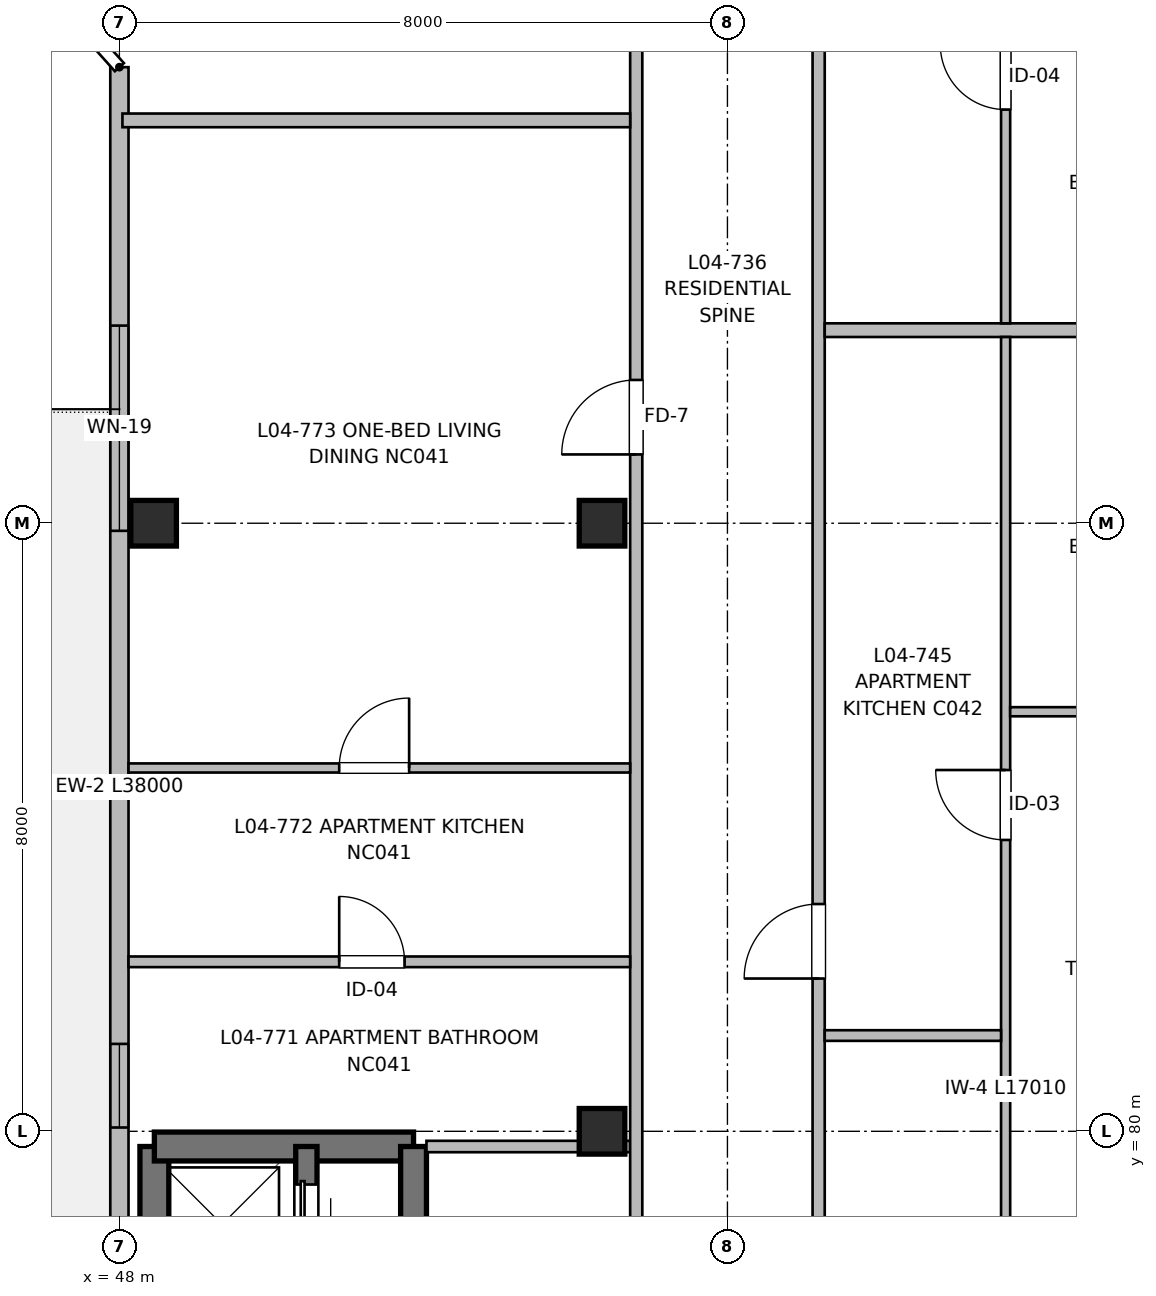
"""IFC4 building model, lengths in metres.
Left out: names, types, materials, properties, quantities, classifications, styles, units other than length and angle.
Written with IfcOpenShell. Run it as: python <this file> out.ifc"""

import sys

from ifc_helpers import new_model, si_unit, direction, frame, frame_2d, origin, origin_2d, place, context, subcontext, project, spatial, rectangle, extrude, element, fill, save


model = new_model("IFC4")
c1 = context("Model", 3, precision=1e-05, world=origin(), true_north=direction((0.0, 1.0)))
c2 = subcontext(c1, "Body", "Model", "MODEL_VIEW")
j1 = project(units=[si_unit("LENGTHUNIT", "METRE"), si_unit("PLANEANGLEUNIT", "RADIAN")], contexts=[c1])
p1 = place(None, origin())
s1 = spatial("IfcSite", under=j1, at=p1, CompositionType="ELEMENT")
p2 = place(p1, origin())
s2 = spatial("IfcBuilding", under=s1, at=p2, CompositionType="ELEMENT")
p3 = place(p2, frame((0.0, 0.0, 13.76)))
s3 = spatial("IfcBuildingStorey", under=s2, at=p3, CompositionType="ELEMENT", Elevation=13.76)
for number, where, z_axis, x_axis in (
    (1, (48.45, 88.0, 0.0), (0.0, 0.0, 1.0), (1.0, 0.0, 0.0)),
    (2, (54.35, 80.0, 0.0), (0.0, 0.0, 1.0), (1.0, 0.0, 0.0)),
    (3, (54.35, 88.0, 0.0), (0.0, 0.0, 1.0), (1.0, 0.0, 0.0)),
):
    element("IfcColumn", number, at=place(p3, frame(where, z_axis=z_axis, x_axis=x_axis)), inside=s3, PredefinedType="COLUMN", context=c2, shape_type="SweptSolid", body=[
        extrude(rectangle(XDim=0.6, YDim=0.6, at=origin_2d()), origin(), (0.0, 0.0, 1.0), 3.2),
    ])
p4 = place(p3, frame((48.46, 67.35, 0.0), z_axis=(0.0, 0.0, 1.0), x_axis=(0.0, 1.0, 0.0)))
e4 = element("IfcWall", 4, at=p4, inside=s3, PredefinedType="SHEAR", context=c2, shape_type="SweptSolid", body=[
    extrude(rectangle(XDim=12.45, YDim=0.38, at=frame_2d((6.225, 0.0))), origin(), (0.0, 0.0, 1.0), 3.2),
])
p5 = place(p4, frame((2.2, 0.0, 0.97)))
e5 = element("IfcOpeningElement", 5, at=p5, cuts=e4, PredefinedType="OPENING", context=c2, shape_type="SweptSolid", body=[
    extrude(rectangle(XDim=0.95, YDim=1.25, at=frame_2d((0.475, 0.625))), frame((0.0, 0.2, 0.0), z_axis=(0.0, -1.0, 0.0), x_axis=(1.0, 0.0, 0.0)), (0.0, 0.0, 1.0), 0.4),
])
p6 = place(p3, frame((48.46, 79.8, 0.0), z_axis=(0.0, 0.0, 1.0), x_axis=(1.0, 0.0, 0.0)))
e6 = element("IfcWall", 6, at=p6, inside=s3, PredefinedType="SHEAR", context=c2, shape_type="SweptSolid", body=[
    extrude(rectangle(XDim=3.41, YDim=0.38, at=frame_2d((1.705, 0.0))), origin(), (0.0, 0.0, 1.0), 3.2),
])
p7 = place(p3, frame((51.87, 79.8, 0.0), z_axis=(0.0, 0.0, 1.0), x_axis=(0.0, -1.0, 0.0)))
e7 = element("IfcWall", 7, at=p7, inside=s3, PredefinedType="SHEAR", context=c2, shape_type="SweptSolid", body=[
    extrude(rectangle(XDim=12.45, YDim=0.34, at=frame_2d((6.225, 0.0))), origin(), (0.0, 0.0, 1.0), 3.2),
])
p8 = place(p7, frame((10.85, 0.0, 0.0)))
e8 = element("IfcOpeningElement", 8, at=p8, cuts=e7, PredefinedType="OPENING", context=c2, shape_type="SweptSolid", body=[
    extrude(rectangle(XDim=1.05, YDim=2.15, at=frame_2d((0.525, 1.075))), frame((0.0, 0.18, 0.0), z_axis=(0.0, -1.0, 0.0), x_axis=(1.0, 0.0, 0.0)), (0.0, 0.0, 1.0), 0.36),
])
p9 = place(p3, frame((50.46, 74.55, 0.0), z_axis=(0.0, 0.0, 1.0), x_axis=(0.0, 1.0, 0.0)))
e9 = element("IfcWall", 9, at=p9, inside=s3, PredefinedType="SHEAR", context=c2, shape_type="SweptSolid", body=[
    extrude(rectangle(XDim=5.25, YDim=0.28, at=frame_2d((2.625, 0.0))), origin(), (0.0, 0.0, 1.0), 3.2),
])
p10 = place(p9, frame((1.15, 0.0, 0.0)))
e10 = element("IfcOpeningElement", 10, at=p10, cuts=e9, PredefinedType="OPENING", context=c2, shape_type="SweptSolid", body=[
    extrude(rectangle(XDim=1.0, YDim=2.15, at=frame_2d((0.5, 1.075))), frame((0.0, 0.15, 0.0), z_axis=(0.0, -1.0, 0.0), x_axis=(1.0, 0.0, 0.0)), (0.0, 0.0, 1.0), 0.3),
])
p11 = place(p9, frame((3.85, 0.0, 0.0)))
e11 = element("IfcOpeningElement", 11, at=p11, cuts=e9, PredefinedType="OPENING", context=c2, shape_type="SweptSolid", body=[
    extrude(rectangle(XDim=0.9, YDim=2.15, at=frame_2d((0.45, 1.075))), frame((0.0, 0.15, 0.0), z_axis=(0.0, -1.0, 0.0), x_axis=(1.0, 0.0, 0.0)), (0.0, 0.0, 1.0), 0.3),
])
p12 = place(p3, frame((48.0, 56.0, 0.0), z_axis=(0.0, 0.0, 1.0), x_axis=(0.0, 1.0, 0.0)))
e12 = element("IfcWall", 12, at=p12, inside=s3, PredefinedType="SOLIDWALL", context=c2, shape_type="SweptSolid", body=[
    extrude(rectangle(XDim=38.0, YDim=0.24, at=frame_2d((19.0, 0.0))), origin(), (0.0, 0.0, 1.0), 2.98),
])
p13 = place(p12, frame((4.15, 0.0, 0.0)))
e13 = element("IfcOpeningElement", 13, at=p13, cuts=e12, PredefinedType="OPENING", context=c2, shape_type="SweptSolid", body=[
    extrude(rectangle(XDim=1.2, YDim=2.2, at=frame_2d((0.6, 1.1))), frame((0.0, 0.13, 0.0), z_axis=(0.0, -1.0, 0.0), x_axis=(1.0, 0.0, 0.0)), (0.0, 0.0, 1.0), 0.26),
])
p14 = place(p12, frame((6.05, 0.0, 0.77)))
e14 = element("IfcOpeningElement", 14, at=p14, cuts=e12, PredefinedType="OPENING", context=c2, shape_type="SweptSolid", body=[
    extrude(rectangle(XDim=1.45, YDim=1.45, at=frame_2d((0.725, 0.725))), frame((0.0, 0.13, 0.0), z_axis=(0.0, -1.0, 0.0), x_axis=(1.0, 0.0, 0.0)), (0.0, 0.0, 1.0), 0.26),
])
p15 = place(p12, frame((13.925, 0.0, 0.9)))
e15 = element("IfcOpeningElement", 15, at=p15, cuts=e12, PredefinedType="OPENING", context=c2, shape_type="SweptSolid", body=[
    extrude(rectangle(XDim=0.65, YDim=0.95, at=frame_2d((0.325, 0.475))), frame((0.0, 0.13, 0.0), z_axis=(0.0, -1.0, 0.0), x_axis=(1.0, 0.0, 0.0)), (0.0, 0.0, 1.0), 0.26),
])
p16 = place(p12, frame((24.05, 0.0, 0.62)))
e16 = element("IfcOpeningElement", 16, at=p16, cuts=e12, PredefinedType="OPENING", context=c2, shape_type="SweptSolid", body=[
    extrude(rectangle(XDim=1.1, YDim=1.6, at=frame_2d((0.55, 0.8))), frame((0.0, 0.13, 0.0), z_axis=(0.0, -1.0, 0.0), x_axis=(1.0, 0.0, 0.0)), (0.0, 0.0, 1.0), 0.26),
])
p17 = place(p12, frame((31.9, 0.0, 0.47)))
e17 = element("IfcOpeningElement", 17, at=p17, cuts=e12, PredefinedType="OPENING", context=c2, shape_type="SweptSolid", body=[
    extrude(rectangle(XDim=2.7, YDim=1.75, at=frame_2d((1.35, 0.875))), frame((0.0, 0.13, 0.0), z_axis=(0.0, -1.0, 0.0), x_axis=(1.0, 0.0, 0.0)), (0.0, 0.0, 1.0), 0.26),
])
p18 = place(p3, frame((52.04, 79.8, 0.0), z_axis=(0.0, 0.0, 1.0), x_axis=(1.0, 0.0, 0.0)))
e18 = element("IfcWall", 18, at=p18, inside=s3, PredefinedType="PARTITIONING", context=c2, shape_type="SweptSolid", body=[
    extrude(rectangle(XDim=2.68, YDim=0.15, at=frame_2d((1.34, 0.0))), origin(), (0.0, 0.0, 1.0), 2.935),
])
p19 = place(p3, frame((54.8, 56.16, 0.0), z_axis=(0.0, 0.0, 1.0), x_axis=(0.0, 1.0, 0.0)))
e19 = element("IfcWall", 19, at=p19, inside=s3, PredefinedType="PARTITIONING", context=c2, shape_type="SweptSolid", body=[
    extrude(rectangle(XDim=50.64, YDim=0.16, at=frame_2d((25.32, 0.0))), origin(), (0.0, 0.0, 1.0), 2.935),
])
p20 = place(p19, frame((12.84, 0.0, 0.0)))
e20 = element("IfcOpeningElement", 20, at=p20, cuts=e19, PredefinedType="OPENING", context=c2, shape_type="SweptSolid", body=[
    extrude(rectangle(XDim=1.1, YDim=2.15, at=frame_2d((0.55, 1.075))), frame((0.0, 0.09, 0.0), z_axis=(0.0, -1.0, 0.0), x_axis=(1.0, 0.0, 0.0)), (0.0, 0.0, 1.0), 0.18),
])
p21 = place(p19, frame((19.24, 0.0, 0.0)))
e21 = element("IfcOpeningElement", 21, at=p21, cuts=e19, PredefinedType="OPENING", context=c2, shape_type="SweptSolid", body=[
    extrude(rectangle(XDim=1.6, YDim=2.15, at=frame_2d((0.8, 1.075))), frame((0.0, 0.09, 0.0), z_axis=(0.0, -1.0, 0.0), x_axis=(1.0, 0.0, 0.0)), (0.0, 0.0, 1.0), 0.18),
])
p22 = place(p19, frame((1.8, 0.0, 0.0)))
e22 = element("IfcOpeningElement", 22, at=p22, cuts=e19, PredefinedType="OPENING", context=c2, shape_type="SweptSolid", body=[
    extrude(rectangle(XDim=0.96, YDim=2.15, at=frame_2d((0.48, 1.075))), frame((0.0, 0.09, 0.0), z_axis=(0.0, -1.0, 0.0), x_axis=(1.0, 0.0, 0.0)), (0.0, 0.0, 1.0), 0.18),
])
p23 = place(p19, frame((32.745, 0.0, 0.0)))
e23 = element("IfcOpeningElement", 23, at=p23, cuts=e19, PredefinedType="OPENING", context=c2, shape_type="SweptSolid", body=[
    extrude(rectangle(XDim=0.98, YDim=2.15, at=frame_2d((0.49, 1.075))), frame((0.0, 0.09, 0.0), z_axis=(0.0, -1.0, 0.0), x_axis=(1.0, 0.0, 0.0)), (0.0, 0.0, 1.0), 0.18),
])
p24 = place(p19, frame((40.955, 0.0, 0.0)))
e24 = element("IfcOpeningElement", 24, at=p24, cuts=e19, PredefinedType="OPENING", context=c2, shape_type="SweptSolid", body=[
    extrude(rectangle(XDim=0.98, YDim=2.15, at=frame_2d((0.49, 1.075))), frame((0.0, 0.09, 0.0), z_axis=(0.0, -1.0, 0.0), x_axis=(1.0, 0.0, 0.0)), (0.0, 0.0, 1.0), 0.18),
])
p25 = place(p3, frame((57.2, 56.16, 0.0), z_axis=(0.0, 0.0, 1.0), x_axis=(0.0, 1.0, 0.0)))
e25 = element("IfcWall", 25, at=p25, inside=s3, PredefinedType="PARTITIONING", context=c2, shape_type="SweptSolid", body=[
    extrude(rectangle(XDim=50.64, YDim=0.16, at=frame_2d((25.32, 0.0))), origin(), (0.0, 0.0, 1.0), 2.935),
])
p26 = place(p25, frame((8.62, 0.0, 0.0)))
e26 = element("IfcOpeningElement", 26, at=p26, cuts=e25, PredefinedType="OPENING", context=c2, shape_type="SweptSolid", body=[
    extrude(rectangle(XDim=0.98, YDim=2.15, at=frame_2d((0.49, 1.075))), frame((0.0, 0.09, 0.0), z_axis=(0.0, -1.0, 0.0), x_axis=(1.0, 0.0, 0.0)), (0.0, 0.0, 1.0), 0.18),
])
p27 = place(p25, frame((25.85, 0.0, 0.0)))
e27 = element("IfcOpeningElement", 27, at=p27, cuts=e25, PredefinedType="OPENING", context=c2, shape_type="SweptSolid", body=[
    extrude(rectangle(XDim=0.98, YDim=2.15, at=frame_2d((0.49, 1.075))), frame((0.0, 0.09, 0.0), z_axis=(0.0, -1.0, 0.0), x_axis=(1.0, 0.0, 0.0)), (0.0, 0.0, 1.0), 0.18),
])
p28 = place(p25, frame((42.62, 0.0, 0.0)))
e28 = element("IfcOpeningElement", 28, at=p28, cuts=e25, PredefinedType="OPENING", context=c2, shape_type="SweptSolid", body=[
    extrude(rectangle(XDim=0.98, YDim=2.15, at=frame_2d((0.49, 1.075))), frame((0.0, 0.09, 0.0), z_axis=(0.0, -1.0, 0.0), x_axis=(1.0, 0.0, 0.0)), (0.0, 0.0, 1.0), 0.18),
])
p29 = place(p3, frame((57.28, 90.54, 0.0), z_axis=(0.0, 0.0, 1.0), x_axis=(1.0, 0.0, 0.0)))
e29 = element("IfcWall", 29, at=p29, inside=s3, PredefinedType="PARTITIONING", context=c2, shape_type="SweptSolid", body=[
    extrude(rectangle(XDim=8.707, YDim=0.18, at=frame_2d((4.353, 0.0))), origin(), (0.0, 0.0, 1.0), 2.935),
])
p30 = place(p3, frame((59.66, 73.44, 0.0), z_axis=(0.0, 0.0, 1.0), x_axis=(0.0, 1.0, 0.0)))
e30 = element("IfcWall", 30, at=p30, inside=s3, PredefinedType="PARTITIONING", context=c2, shape_type="SweptSolid", body=[
    extrude(rectangle(XDim=17.01, YDim=0.12, at=frame_2d((8.505, 0.0))), origin(), (0.0, 0.0, 1.0), 2.935),
])
p31 = place(p30, frame((2.972, 0.0, 0.0)))
e31 = element("IfcOpeningElement", 31, at=p31, cuts=e30, PredefinedType="OPENING", context=c2, shape_type="SweptSolid", body=[
    extrude(rectangle(XDim=0.86, YDim=2.1, at=frame_2d((0.43, 1.05))), frame((0.0, 0.07, 0.0), z_axis=(0.0, -1.0, 0.0), x_axis=(1.0, 0.0, 0.0)), (0.0, 0.0, 1.0), 0.14),
])
p32 = place(p30, frame((10.393, 0.0, 0.0)))
e32 = element("IfcOpeningElement", 32, at=p32, cuts=e30, PredefinedType="OPENING", context=c2, shape_type="SweptSolid", body=[
    extrude(rectangle(XDim=0.92, YDim=2.1, at=frame_2d((0.46, 1.05))), frame((0.0, 0.07, 0.0), z_axis=(0.0, -1.0, 0.0), x_axis=(1.0, 0.0, 0.0)), (0.0, 0.0, 1.0), 0.14),
])
p33 = place(p3, frame((57.28, 81.26, 0.0), z_axis=(0.0, 0.0, 1.0), x_axis=(1.0, 0.0, 0.0)))
e33 = element("IfcWall", 33, at=p33, inside=s3, PredefinedType="PARTITIONING", context=c2, shape_type="SweptSolid", body=[
    extrude(rectangle(XDim=2.32, YDim=0.14, at=frame_2d((1.16, 0.0))), origin(), (0.0, 0.0, 1.0), 2.935),
])
p34 = place(p3, frame((59.72, 85.52, 0.0), z_axis=(0.0, 0.0, 1.0), x_axis=(1.0, 0.0, 0.0)))
e34 = element("IfcWall", 34, at=p34, inside=s3, PredefinedType="PARTITIONING", context=c2, shape_type="SweptSolid", body=[
    extrude(rectangle(XDim=4.16, YDim=0.12, at=frame_2d((2.08, 0.0))), origin(), (0.0, 0.0, 1.0), 2.935),
])
p35 = place(p34, frame((1.64, 0.0, 0.0)))
e35 = element("IfcOpeningElement", 35, at=p35, cuts=e34, PredefinedType="OPENING", context=c2, shape_type="SweptSolid", body=[
    extrude(rectangle(XDim=0.88, YDim=2.1, at=frame_2d((0.44, 1.05))), frame((0.0, 0.07, 0.0), z_axis=(0.0, -1.0, 0.0), x_axis=(1.0, 0.0, 0.0)), (0.0, 0.0, 1.0), 0.14),
])
p36 = place(p3, frame((59.66, 90.63, 0.0), z_axis=(0.0, 0.0, 1.0), x_axis=(0.0, 1.0, 0.0)))
e36 = element("IfcWall", 36, at=p36, inside=s3, PredefinedType="PARTITIONING", context=c2, shape_type="SweptSolid", body=[
    extrude(rectangle(XDim=16.09, YDim=0.12, at=frame_2d((8.045, 0.0))), origin(), (0.0, 0.0, 1.0), 2.935),
])
p37 = place(p36, frame((2.812, 0.0, 0.0)))
e37 = element("IfcOpeningElement", 37, at=p37, cuts=e36, PredefinedType="OPENING", context=c2, shape_type="SweptSolid", body=[
    extrude(rectangle(XDim=0.86, YDim=2.1, at=frame_2d((0.43, 1.05))), frame((0.0, 0.07, 0.0), z_axis=(0.0, -1.0, 0.0), x_axis=(1.0, 0.0, 0.0)), (0.0, 0.0, 1.0), 0.14),
])
p38 = place(p36, frame((9.833, 0.0, 0.0)))
e38 = element("IfcOpeningElement", 38, at=p38, cuts=e36, PredefinedType="OPENING", context=c2, shape_type="SweptSolid", body=[
    extrude(rectangle(XDim=0.92, YDim=2.1, at=frame_2d((0.46, 1.05))), frame((0.0, 0.07, 0.0), z_axis=(0.0, -1.0, 0.0), x_axis=(1.0, 0.0, 0.0)), (0.0, 0.0, 1.0), 0.14),
])
p39 = place(p3, frame((48.04, 93.3, 0.0), z_axis=(0.0, 0.0, 1.0), x_axis=(1.0, 0.0, 0.0)))
e39 = element("IfcWall", 39, at=p39, inside=s3, PredefinedType="PARTITIONING", context=c2, shape_type="SweptSolid", body=[
    extrude(rectangle(XDim=6.68, YDim=0.18, at=frame_2d((3.34, 0.0))), origin(), (0.0, 0.0, 1.0), 2.935),
])
p40 = place(p3, frame((48.12, 82.23, 0.0), z_axis=(0.0, 0.0, 1.0), x_axis=(1.0, 0.0, 0.0)))
e40 = element("IfcWall", 40, at=p40, inside=s3, PredefinedType="PARTITIONING", context=c2, shape_type="SweptSolid", body=[
    extrude(rectangle(XDim=6.6, YDim=0.14, at=frame_2d((3.3, 0.0))), origin(), (0.0, 0.0, 1.0), 2.935),
])
p41 = place(p40, frame((2.772, 0.0, 0.0)))
e41 = element("IfcOpeningElement", 41, at=p41, cuts=e40, PredefinedType="OPENING", context=c2, shape_type="SweptSolid", body=[
    extrude(rectangle(XDim=0.86, YDim=2.1, at=frame_2d((0.43, 1.05))), frame((0.0, 0.08, 0.0), z_axis=(0.0, -1.0, 0.0), x_axis=(1.0, 0.0, 0.0)), (0.0, 0.0, 1.0), 0.16),
])
p42 = place(p3, frame((48.12, 84.78, 0.0), z_axis=(0.0, 0.0, 1.0), x_axis=(1.0, 0.0, 0.0)))
e42 = element("IfcWall", 42, at=p42, inside=s3, PredefinedType="PARTITIONING", context=c2, shape_type="SweptSolid", body=[
    extrude(rectangle(XDim=6.6, YDim=0.12, at=frame_2d((3.3, 0.0))), origin(), (0.0, 0.0, 1.0), 2.935),
])
p43 = place(p42, frame((2.772, 0.0, 0.0)))
e43 = element("IfcOpeningElement", 43, at=p43, cuts=e42, PredefinedType="OPENING", context=c2, shape_type="SweptSolid", body=[
    extrude(rectangle(XDim=0.92, YDim=2.1, at=frame_2d((0.46, 1.05))), frame((0.0, 0.07, 0.0), z_axis=(0.0, -1.0, 0.0), x_axis=(1.0, 0.0, 0.0)), (0.0, 0.0, 1.0), 0.14),
])
p44 = place(p11, origin())
e44 = element("IfcDoor", 44, at=p44, inside=s3, OperationType="SLIDING_TO_RIGHT", PredefinedType="DOOR", context=c2, shape_type="SweptSolid", body=[
    extrude(rectangle(XDim=0.9, YDim=2.15, at=frame_2d((0.45, 1.075))), frame((0.0, 0.025, 0.0), z_axis=(0.0, -1.0, 0.0), x_axis=(1.0, 0.0, 0.0)), (0.0, 0.0, 1.0), 0.05),
])
fill(e11, e44)
p45 = place(p16, origin())
e45 = element("IfcWindow", 45, at=p45, inside=s3, PartitioningType="SINGLE_PANEL", PredefinedType="WINDOW", context=c2, shape_type="SweptSolid", body=[
    extrude(rectangle(XDim=1.1, YDim=1.6, at=frame_2d((0.55, 0.8))), frame((0.0, 0.03, 0.0), z_axis=(0.0, -1.0, 0.0), x_axis=(1.0, 0.0, 0.0)), (0.0, 0.0, 1.0), 0.06),
])
fill(e16, e45)
p46 = place(p17, origin())
e46 = element("IfcWindow", 46, at=p46, inside=s3, PartitioningType="SINGLE_PANEL", PredefinedType="WINDOW", context=c2, shape_type="SweptSolid", body=[
    extrude(rectangle(XDim=2.7, YDim=1.75, at=frame_2d((1.35, 0.875))), frame((0.0, 0.03, 0.0), z_axis=(0.0, -1.0, 0.0), x_axis=(1.0, 0.0, 0.0)), (0.0, 0.0, 1.0), 0.06),
])
fill(e17, e46)
p47 = place(p32, origin())
e47 = element("IfcDoor", 47, at=p47, inside=s3, OperationType="SINGLE_SWING_RIGHT", PredefinedType="DOOR", context=c2, shape_type="SweptSolid", body=[
    extrude(rectangle(XDim=0.92, YDim=2.1, at=frame_2d((0.46, 1.05))), frame((0.0, 0.025, 0.0), z_axis=(0.0, -1.0, 0.0), x_axis=(1.0, 0.0, 0.0)), (0.0, 0.0, 1.0), 0.05),
])
fill(e32, e47)
p48 = place(p27, origin())
e48 = element("IfcDoor", 48, at=p48, inside=s3, OperationType="SINGLE_SWING_LEFT", PredefinedType="DOOR", context=c2, shape_type="SweptSolid", body=[
    extrude(rectangle(XDim=0.98, YDim=2.15, at=frame_2d((0.49, 1.075))), frame((0.0, 0.025, 0.0), z_axis=(0.0, -1.0, 0.0), x_axis=(1.0, 0.0, 0.0)), (0.0, 0.0, 1.0), 0.05),
])
fill(e27, e48)
p49 = place(p37, origin())
e49 = element("IfcDoor", 49, at=p49, inside=s3, OperationType="SINGLE_SWING_RIGHT", PredefinedType="DOOR", context=c2, shape_type="SweptSolid", body=[
    extrude(rectangle(XDim=0.86, YDim=2.1, at=frame_2d((0.43, 1.05))), frame((0.0, 0.025, 0.0), z_axis=(0.0, -1.0, 0.0), x_axis=(1.0, 0.0, 0.0)), (0.0, 0.0, 1.0), 0.05),
])
fill(e37, e49)
p50 = place(p41, origin())
e50 = element("IfcDoor", 50, at=p50, inside=s3, OperationType="SINGLE_SWING_LEFT", PredefinedType="DOOR", context=c2, shape_type="SweptSolid", body=[
    extrude(rectangle(XDim=0.86, YDim=2.1, at=frame_2d((0.43, 1.05))), frame((0.0, 0.025, 0.0), z_axis=(0.0, -1.0, 0.0), x_axis=(1.0, 0.0, 0.0)), (0.0, 0.0, 1.0), 0.05),
])
fill(e41, e50)
p51 = place(p43, origin())
e51 = element("IfcDoor", 51, at=p51, inside=s3, OperationType="SINGLE_SWING_RIGHT", PredefinedType="DOOR", context=c2, shape_type="SweptSolid", body=[
    extrude(rectangle(XDim=0.92, YDim=2.1, at=frame_2d((0.46, 1.05))), frame((0.0, 0.025, 0.0), z_axis=(0.0, -1.0, 0.0), x_axis=(1.0, 0.0, 0.0)), (0.0, 0.0, 1.0), 0.05),
])
fill(e43, e51)
p52 = place(p23, origin())
e52 = element("IfcDoor", 52, at=p52, inside=s3, OperationType="SINGLE_SWING_LEFT", PredefinedType="DOOR", context=c2, shape_type="SweptSolid", body=[
    extrude(rectangle(XDim=0.98, YDim=2.15, at=frame_2d((0.49, 1.075))), frame((0.0, 0.025, 0.0), z_axis=(0.0, -1.0, 0.0), x_axis=(1.0, 0.0, 0.0)), (0.0, 0.0, 1.0), 0.05),
])
fill(e23, e52)
save(model, sys.argv[1])
